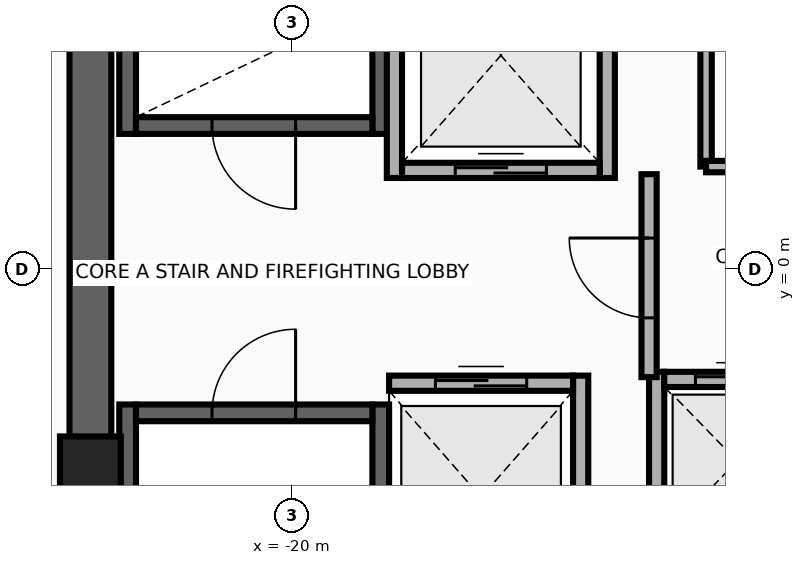
"""IFC4 building model, lengths in metres.
Left out: names, types, materials, properties, quantities, classifications, styles, units other than length and angle.
Written with IfcOpenShell. Run it as: python <this file> out.ifc"""

import sys

from ifc_helpers import new_model, si_unit, direction, frame, frame_2d, origin, origin_2d, place, context, subcontext, project, spatial, rectangle, extrude, source, transform, mapped, element, fill, save


model = new_model("IFC4")
c1 = context("Model", 3, precision=1e-05, world=origin(), true_north=direction((0.0, 1.0)))
c2 = subcontext(c1, "Body", "Model", "MODEL_VIEW")
j1 = project(units=[si_unit("LENGTHUNIT", "METRE"), si_unit("PLANEANGLEUNIT", "RADIAN")], contexts=[c1])
p1 = place(None, origin())
s1 = spatial("IfcSite", under=j1, at=p1, CompositionType="ELEMENT")
p2 = place(p1, origin())
s2 = spatial("IfcBuilding", under=s1, at=p2, CompositionType="ELEMENT")
p3 = place(p2, frame((0.0, 0.0, 283.5)))
s3 = spatial("IfcBuildingStorey", under=s2, at=p3, CompositionType="ELEMENT", Elevation=283.5)
for number, where, z_axis, x_axis in (
    (1, (-22.16, 1.78, 0.0), (0.0, 0.0, 1.0), (0.0, 1.0, 0.0)),
    (2, (-18.83, 1.78, 0.0), (0.0, 0.0, 1.0), (0.0, 1.0, 0.0)),
):
    element("IfcWall", number, at=place(p3, frame(where, z_axis=z_axis, x_axis=x_axis)), inside=s3, PredefinedType="SHEAR", context=c2, shape_type="SweptSolid", body=[
        extrude(rectangle(XDim=8.745, YDim=0.22, at=frame_2d((4.373, 0.0))), origin(), (0.0, 0.0, 1.0), 3.26),
    ])
p4 = place(p3, frame((-22.05, 1.89, 0.0), z_axis=(0.0, 0.0, 1.0), x_axis=(1.0, 0.0, 0.0)))
e3 = element("IfcWall", 3, at=p4, inside=s3, PredefinedType="SHEAR", context=c2, shape_type="SweptSolid", body=[
    extrude(rectangle(XDim=3.11, YDim=0.22, at=frame_2d((1.555, 0.0))), origin(), (0.0, 0.0, 1.0), 3.26),
])
p5 = place(p4, frame((1.0, 0.0, 0.0)))
e4 = element("IfcOpeningElement", 4, at=p5, cuts=e3, PredefinedType="OPENING", context=c2, shape_type="SweptSolid", body=[
    extrude(rectangle(XDim=1.1, YDim=2.15, at=frame_2d((0.55, 1.075))), frame((0.0, 0.125, 0.0), z_axis=(0.0, -1.0, 0.0), x_axis=(1.0, 0.0, 0.0)), (0.0, 0.0, 1.0), 0.25),
])
for number, where, z_axis, x_axis in (
    (5, (-22.16, -10.525, 0.0), (0.0, 0.0, 1.0), (0.0, 1.0, 0.0)),
    (6, (-18.83, -10.525, 0.0), (0.0, 0.0, 1.0), (0.0, 1.0, 0.0)),
):
    element("IfcWall", number, at=place(p3, frame(where, z_axis=z_axis, x_axis=x_axis)), inside=s3, PredefinedType="SHEAR", context=c2, shape_type="SweptSolid", body=[
        extrude(rectangle(XDim=8.745, YDim=0.22, at=frame_2d((4.373, 0.0))), origin(), (0.0, 0.0, 1.0), 3.26),
    ])
p6 = place(p3, frame((-22.05, -1.89, 0.0), z_axis=(0.0, 0.0, 1.0), x_axis=(1.0, 0.0, 0.0)))
e7 = element("IfcWall", 7, at=p6, inside=s3, PredefinedType="SHEAR", context=c2, shape_type="SweptSolid", body=[
    extrude(rectangle(XDim=3.11, YDim=0.22, at=frame_2d((1.555, 0.0))), origin(), (0.0, 0.0, 1.0), 3.26),
])
p7 = place(p6, frame((1.0, 0.0, 0.0)))
e8 = element("IfcOpeningElement", 8, at=p7, cuts=e7, PredefinedType="OPENING", context=c2, shape_type="SweptSolid", body=[
    extrude(rectangle(XDim=1.1, YDim=2.15, at=frame_2d((0.55, 1.075))), frame((0.0, 0.125, 0.0), z_axis=(0.0, -1.0, 0.0), x_axis=(1.0, 0.0, 0.0)), (0.0, 0.0, 1.0), 0.25),
])
p8 = place(p3, frame((-22.65, -11.075, 0.0), z_axis=(0.0, 0.0, 1.0), x_axis=(0.0, 1.0, 0.0)))
e9 = element("IfcWall", 9, at=p8, inside=s3, PredefinedType="SHEAR", context=c2, shape_type="SweptSolid", body=[
    extrude(rectangle(XDim=22.15, YDim=0.55, at=frame_2d((11.075, 0.0))), origin(), (0.0, 0.0, 1.0), 3.26),
])
m1 = source(origin(), c2, "Body", "SweptSolid", [
    extrude(rectangle(XDim=0.8, YDim=0.8, at=origin_2d()), origin(), (0.0, 0.0, 1.0), 3.5),
])
p9 = place(p3, frame((-22.65, -2.6, 0.0), z_axis=(0.0, 0.0, 1.0), x_axis=(1.0, 0.0, 0.0)))
e10 = element("IfcColumn", 10, at=p9, inside=s3, PredefinedType="COLUMN", context=c2, shape_type="MappedRepresentation", body=[
    mapped(m1, transform((0.0, 0.0, 0.0), x_axis=(1.0, 0.0, 0.0), y_axis=(0.0, 1.0, 0.0), z_axis=(0.0, 0.0, 1.0), scale=1.0)),
])
for number, where, z_axis, x_axis in (
    (11, (-18.65, 1.2, 0.0), (0.0, 0.0, 1.0), (0.0, 1.0, 0.0)),
    (12, (-15.85, 1.2, 0.0), (0.0, 0.0, 1.0), (0.0, 1.0, 0.0)),
):
    element("IfcWall", number, at=place(p3, frame(where, z_axis=z_axis, x_axis=x_axis)), inside=s3, PredefinedType="MOVABLE", context=c2, shape_type="SweptSolid", body=[
        extrude(rectangle(XDim=3.225, YDim=0.2, at=frame_2d((1.613, 0.0))), origin(), (0.0, 0.0, 1.0), 3.26),
    ])
p10 = place(p3, frame((-18.55, 1.3, 0.0), z_axis=(0.0, 0.0, 1.0), x_axis=(1.0, 0.0, 0.0)))
e13 = element("IfcWall", 13, at=p10, inside=s3, PredefinedType="MOVABLE", context=c2, shape_type="SweptSolid", body=[
    extrude(rectangle(XDim=2.6, YDim=0.2, at=frame_2d((1.3, 0.0))), origin(), (0.0, 0.0, 1.0), 3.26),
])
p11 = place(p10, frame((0.7, 0.0, 0.0)))
e14 = element("IfcOpeningElement", 14, at=p11, cuts=e13, PredefinedType="OPENING", context=c2, shape_type="SweptSolid", body=[
    extrude(rectangle(XDim=1.2, YDim=2.1, at=frame_2d((0.6, 1.05))), frame((0.0, 0.115, 0.0), z_axis=(0.0, -1.0, 0.0), x_axis=(1.0, 0.0, 0.0)), (0.0, 0.0, 1.0), 0.23),
])
p12 = place(p3, frame((-16.2, -4.6, 0.0), z_axis=(0.0, 0.0, 1.0), x_axis=(0.0, 1.0, 0.0)))
e15 = element("IfcWall", 15, at=p12, inside=s3, PredefinedType="MOVABLE", context=c2, shape_type="SweptSolid", body=[
    extrude(rectangle(XDim=3.2, YDim=0.2, at=frame_2d((1.6, 0.0))), origin(), (0.0, 0.0, 1.0), 3.26),
])
p13 = place(p3, frame((-18.72, -1.5, 0.0), z_axis=(0.0, 0.0, 1.0), x_axis=(1.0, 0.0, 0.0)))
e16 = element("IfcWall", 16, at=p13, inside=s3, PredefinedType="MOVABLE", context=c2, shape_type="SweptSolid", body=[
    extrude(rectangle(XDim=2.42, YDim=0.2, at=frame_2d((1.21, 0.0))), origin(), (0.0, 0.0, 1.0), 3.26),
])
p14 = place(p13, frame((0.61, 0.0, 0.0)))
e17 = element("IfcOpeningElement", 17, at=p14, cuts=e16, PredefinedType="OPENING", context=c2, shape_type="SweptSolid", body=[
    extrude(rectangle(XDim=1.2, YDim=2.1, at=frame_2d((0.6, 1.05))), frame((0.0, 0.115, 0.0), z_axis=(0.0, -1.0, 0.0), x_axis=(1.0, 0.0, 0.0)), (0.0, 0.0, 1.0), 0.23),
])
p15 = place(p3, frame((-15.2, -3.7, 0.0), z_axis=(0.0, 0.0, 1.0), x_axis=(0.0, 1.0, 0.0)))
e18 = element("IfcWall", 18, at=p15, inside=s3, PredefinedType="MOVABLE", context=c2, shape_type="SweptSolid", body=[
    extrude(rectangle(XDim=2.35, YDim=0.2, at=frame_2d((1.175, 0.0))), origin(), (0.0, 0.0, 1.0), 3.26),
])
p16 = place(p3, frame((-15.1, -1.45, 0.0), z_axis=(0.0, 0.0, 1.0), x_axis=(1.0, 0.0, 0.0)))
e19 = element("IfcWall", 19, at=p16, inside=s3, PredefinedType="MOVABLE", context=c2, shape_type="SweptSolid", body=[
    extrude(rectangle(XDim=1.92, YDim=0.2, at=frame_2d((0.96, 0.0))), origin(), (0.0, 0.0, 1.0), 3.26),
])
p17 = place(p16, frame((0.41, 0.0, 0.0)))
e20 = element("IfcOpeningElement", 20, at=p17, cuts=e19, PredefinedType="OPENING", context=c2, shape_type="SweptSolid", body=[
    extrude(rectangle(XDim=1.1, YDim=2.1, at=frame_2d((0.55, 1.05))), frame((0.0, 0.115, 0.0), z_axis=(0.0, -1.0, 0.0), x_axis=(1.0, 0.0, 0.0)), (0.0, 0.0, 1.0), 0.23),
])
p18 = place(p3, frame((-15.3, -1.42, 0.0), z_axis=(0.0, 0.0, 1.0), x_axis=(0.0, 1.0, 0.0)))
e21 = element("IfcWall", 21, at=p18, inside=s3, PredefinedType="PARTITIONING", context=c2, shape_type="SweptSolid", body=[
    extrude(rectangle(XDim=2.67, YDim=0.2, at=frame_2d((1.335, 0.0))), origin(), (0.0, 0.0, 1.0), 3.26),
])
p19 = place(p18, frame((0.78, 0.0, 0.0)))
e22 = element("IfcOpeningElement", 22, at=p19, cuts=e21, PredefinedType="OPENING", context=c2, shape_type="SweptSolid", body=[
    extrude(rectangle(XDim=1.05, YDim=2.15, at=frame_2d((0.525, 1.075))), frame((0.0, 0.115, 0.0), z_axis=(0.0, -1.0, 0.0), x_axis=(1.0, 0.0, 0.0)), (0.0, 0.0, 1.0), 0.23),
])
p20 = place(p3, frame((-14.55, 1.35, 0.0), z_axis=(0.0, 0.0, 1.0), x_axis=(0.0, 1.0, 0.0)))
e23 = element("IfcWall", 23, at=p20, inside=s3, PredefinedType="PARTITIONING", context=c2, shape_type="SweptSolid", body=[
    extrude(rectangle(XDim=1.95, YDim=0.15, at=frame_2d((0.975, 0.0))), origin(), (0.0, 0.0, 1.0), 3.26),
])
p21 = place(p3, frame((-14.55, 1.35, 0.0), z_axis=(0.0, 0.0, 1.0), x_axis=(1.0, 0.0, 0.0)))
e24 = element("IfcWall", 24, at=p21, inside=s3, PredefinedType="PARTITIONING", context=c2, shape_type="SweptSolid", body=[
    extrude(rectangle(XDim=1.4, YDim=0.15, at=frame_2d((0.7, 0.0))), origin(), (0.0, 0.0, 1.0), 3.26),
])
p22 = place(p21, frame((0.275, 0.0, 0.0)))
e25 = element("IfcOpeningElement", 25, at=p22, cuts=e24, PredefinedType="OPENING", context=c2, shape_type="SweptSolid", body=[
    extrude(rectangle(XDim=0.85, YDim=2.05, at=frame_2d((0.425, 1.025))), frame((0.0, 0.09, 0.0), z_axis=(0.0, -1.0, 0.0), x_axis=(1.0, 0.0, 0.0)), (0.0, 0.0, 1.0), 0.18),
])
p23 = place(p11, origin())
e26 = element("IfcDoor", 26, at=p23, inside=s3, OperationType="DOUBLE_DOOR_SLIDING", PredefinedType="DOOR", context=c2, shape_type="SweptSolid", body=[
    extrude(rectangle(XDim=1.2, YDim=2.1, at=frame_2d((0.6, 1.05))), frame((0.0, 0.025, 0.0), z_axis=(0.0, -1.0, 0.0), x_axis=(1.0, 0.0, 0.0)), (0.0, 0.0, 1.0), 0.05),
])
fill(e14, e26)
p24 = place(p14, origin())
e27 = element("IfcDoor", 27, at=p24, inside=s3, OperationType="DOUBLE_DOOR_SLIDING", PredefinedType="DOOR", context=c2, shape_type="SweptSolid", body=[
    extrude(rectangle(XDim=1.2, YDim=2.1, at=frame_2d((0.6, 1.05))), frame((0.0, 0.025, 0.0), z_axis=(0.0, -1.0, 0.0), x_axis=(1.0, 0.0, 0.0)), (0.0, 0.0, 1.0), 0.05),
])
fill(e17, e27)
p25 = place(p17, origin())
e28 = element("IfcDoor", 28, at=p25, inside=s3, OperationType="DOUBLE_DOOR_SLIDING", PredefinedType="DOOR", context=c2, shape_type="SweptSolid", body=[
    extrude(rectangle(XDim=1.1, YDim=2.1, at=frame_2d((0.55, 1.05))), frame((0.0, 0.025, 0.0), z_axis=(0.0, -1.0, 0.0), x_axis=(1.0, 0.0, 0.0)), (0.0, 0.0, 1.0), 0.05),
])
fill(e20, e28)
p26 = place(p19, origin())
e29 = element("IfcDoor", 29, at=p26, inside=s3, OperationType="SINGLE_SWING_RIGHT", PredefinedType="DOOR", context=c2, shape_type="SweptSolid", body=[
    extrude(rectangle(XDim=1.05, YDim=2.15, at=frame_2d((0.525, 1.075))), frame((0.0, 0.025, 0.0), z_axis=(0.0, -1.0, 0.0), x_axis=(1.0, 0.0, 0.0)), (0.0, 0.0, 1.0), 0.05),
])
fill(e22, e29)
p27 = place(p5, frame((1.1, 0.0, 0.0), z_axis=(0.0, 0.0, 1.0), x_axis=(-1.0, 0.0, 0.0)))
e30 = element("IfcDoor", 30, at=p27, inside=s3, OperationType="SINGLE_SWING_LEFT", PredefinedType="DOOR", context=c2, shape_type="SweptSolid", body=[
    extrude(rectangle(XDim=1.1, YDim=2.15, at=frame_2d((0.55, 1.075))), frame((0.0, 0.025, 0.0), z_axis=(0.0, -1.0, 0.0), x_axis=(1.0, 0.0, 0.0)), (0.0, 0.0, 1.0), 0.05),
])
fill(e4, e30)
p28 = place(p7, origin())
e31 = element("IfcDoor", 31, at=p28, inside=s3, OperationType="SINGLE_SWING_RIGHT", PredefinedType="DOOR", context=c2, shape_type="SweptSolid", body=[
    extrude(rectangle(XDim=1.1, YDim=2.15, at=frame_2d((0.55, 1.075))), frame((0.0, 0.025, 0.0), z_axis=(0.0, -1.0, 0.0), x_axis=(1.0, 0.0, 0.0)), (0.0, 0.0, 1.0), 0.05),
])
fill(e8, e31)
save(model, sys.argv[1])
